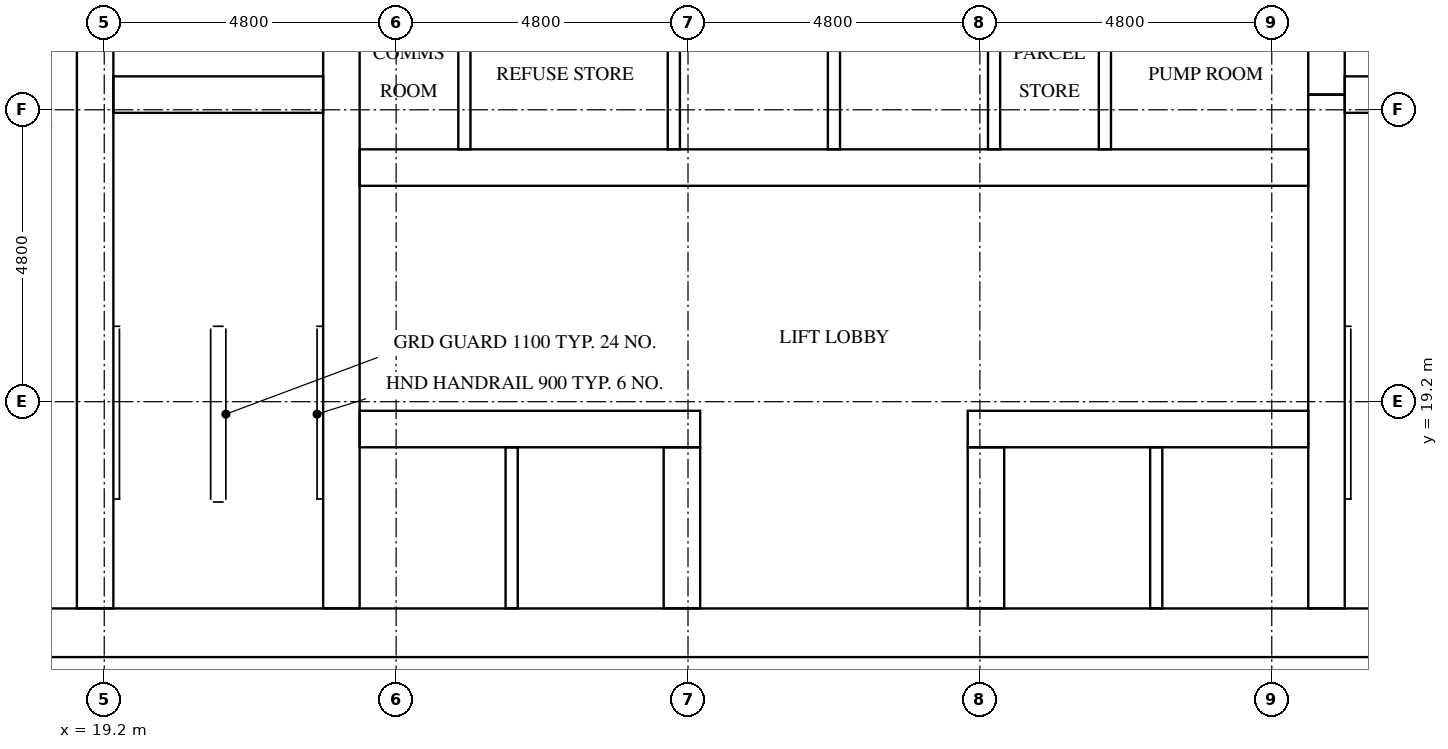
"""IFC4 building model, lengths in metres.
Left out: names, types, materials, properties, quantities, classifications, styles, units other than length and angle.
Written with IfcOpenShell. Run it as: python <this file> out.ifc"""

import sys

from ifc_helpers import new_model, si_unit, direction, frame, frame_2d, origin, place, context, subcontext, project, spatial, rectangle, extrude, element, fill, save


model = new_model("IFC4")
c1 = context("Model", 3, precision=1e-05, world=origin(), true_north=direction((0.0, 1.0)))
c2 = subcontext(c1, "Body", "Model", "MODEL_VIEW")
j1 = project(units=[si_unit("LENGTHUNIT", "METRE"), si_unit("PLANEANGLEUNIT", "RADIAN")], contexts=[c1])
p1 = place(None, origin())
s1 = spatial("IfcSite", under=j1, at=p1, CompositionType="ELEMENT")
p2 = place(p1, origin())
s2 = spatial("IfcBuilding", under=s1, at=p2, CompositionType="ELEMENT")
p3 = place(p2, frame((0.0, 0.0, 122.6)))
s3 = spatial("IfcBuildingStorey", under=s2, at=p3, CompositionType="ELEMENT", Elevation=122.6)
p4 = place(p3, frame((15.0, 15.4, 0.0), z_axis=(0.0, 0.0, 1.0), x_axis=(1.0, 0.0, 0.0)))
e1 = element("IfcWall", 1, at=p4, inside=s3, PredefinedType="SHEAR", context=c2, shape_type="SweptSolid", body=[
    extrude(rectangle(XDim=32.4, YDim=0.8, at=frame_2d((16.2, 0.0))), origin(), (0.0, 0.0, 1.0), 3.2),
])
p5 = place(p4, frame((15.3, 0.0, 0.0)))
e2 = element("IfcOpeningElement", 2, at=p5, cuts=e1, PredefinedType="OPENING", context=c2, shape_type="SweptSolid", body=[
    extrude(rectangle(XDim=1.8, YDim=2.1, at=frame_2d((0.9, 1.05))), frame((0.0, 0.41, 0.0), z_axis=(0.0, -1.0, 0.0), x_axis=(1.0, 0.0, 0.0)), (0.0, 0.0, 1.0), 0.82),
])
p6 = place(p3, frame((19.05, 15.8, 0.0), z_axis=(0.0, 0.0, 1.0), x_axis=(0.0, 1.0, 0.0)))
e3 = element("IfcWall", 3, at=p6, inside=s3, PredefinedType="SHEAR", context=c2, shape_type="SweptSolid", body=[
    extrude(rectangle(XDim=15.15, YDim=0.6, at=frame_2d((7.575, 0.0))), origin(), (0.0, 0.0, 1.0), 3.2),
])
p7 = place(p6, frame((9.65, 0.0, 0.0)))
e4 = element("IfcOpeningElement", 4, at=p7, cuts=e3, PredefinedType="OPENING", context=c2, shape_type="SweptSolid", body=[
    extrude(rectangle(XDim=1.1, YDim=2.1, at=frame_2d((0.55, 1.05))), frame((0.0, 0.31, 0.0), z_axis=(0.0, -1.0, 0.0), x_axis=(1.0, 0.0, 0.0)), (0.0, 0.0, 1.0), 0.62),
])
p8 = place(p6, frame((13.15, 0.0, 0.0)))
e5 = element("IfcOpeningElement", 5, at=p8, cuts=e3, PredefinedType="OPENING", context=c2, shape_type="SweptSolid", body=[
    extrude(rectangle(XDim=1.1, YDim=2.1, at=frame_2d((0.55, 1.05))), frame((0.0, 0.31, 0.0), z_axis=(0.0, -1.0, 0.0), x_axis=(1.0, 0.0, 0.0)), (0.0, 0.0, 1.0), 0.62),
])
p9 = place(p6, frame((0.4, 0.0, 0.0)))
e6 = element("IfcOpeningElement", 6, at=p9, cuts=e3, PredefinedType="OPENING", context=c2, shape_type="SweptSolid", body=[
    extrude(rectangle(XDim=1.2, YDim=2.1, at=frame_2d((0.6, 1.05))), frame((0.0, 0.31, 0.0), z_axis=(0.0, -1.0, 0.0), x_axis=(1.0, 0.0, 0.0)), (0.0, 0.0, 1.0), 0.62),
])
p10 = place(p3, frame((23.1, 15.8, 0.0), z_axis=(0.0, 0.0, 1.0), x_axis=(0.0, 1.0, 0.0)))
e7 = element("IfcWall", 7, at=p10, inside=s3, PredefinedType="SHEAR", context=c2, shape_type="SweptSolid", body=[
    extrude(rectangle(XDim=21.2, YDim=0.6, at=frame_2d((10.6, 0.0))), origin(), (0.0, 0.0, 1.0), 3.2),
])
p11 = place(p3, frame((39.3, 15.8, 0.0), z_axis=(0.0, 0.0, 1.0), x_axis=(0.0, 1.0, 0.0)))
e8 = element("IfcWall", 8, at=p11, inside=s3, PredefinedType="SHEAR", context=c2, shape_type="SweptSolid", body=[
    extrude(rectangle(XDim=8.45, YDim=0.6, at=frame_2d((4.225, 0.0))), origin(), (0.0, 0.0, 1.0), 3.2),
])
p12 = place(p3, frame((39.3, 24.25, 0.0), z_axis=(0.0, 0.0, 1.0), x_axis=(0.0, 1.0, 0.0)))
e9 = element("IfcWall", 9, at=p12, inside=s3, PredefinedType="SHEAR", context=c2, shape_type="SweptSolid", body=[
    extrude(rectangle(XDim=3.5, YDim=0.6, at=frame_2d((1.75, 0.0))), origin(), (0.0, 0.0, 1.0), 3.2),
])
for number, where, z_axis, x_axis in (
    (10, (19.35, 24.25, 0.0), (0.0, 0.0, 1.0), (1.0, 0.0, 0.0)),
    (11, (39.6, 24.25, 0.0), (0.0, 0.0, 1.0), (1.0, 0.0, 0.0)),
):
    element("IfcWall", number, at=place(p3, frame(where, z_axis=z_axis, x_axis=x_axis)), inside=s3, PredefinedType="SHEAR", context=c2, shape_type="SweptSolid", body=[
        extrude(rectangle(XDim=3.45, YDim=0.6, at=frame_2d((1.725, 0.0))), origin(), (0.0, 0.0, 1.0), 3.2),
    ])
p13 = place(p3, frame((23.4, 18.75, 0.0), z_axis=(0.0, 0.0, 1.0), x_axis=(1.0, 0.0, 0.0)))
e12 = element("IfcWall", 12, at=p13, inside=s3, PredefinedType="SHEAR", context=c2, shape_type="SweptSolid", body=[
    extrude(rectangle(XDim=5.6, YDim=0.6, at=frame_2d((2.8, 0.0))), origin(), (0.0, 0.0, 1.0), 3.2),
])
p14 = place(p13, frame((0.65, 0.0, 0.0)))
e13 = element("IfcOpeningElement", 13, at=p14, cuts=e12, PredefinedType="OPENING", context=c2, shape_type="SweptSolid", body=[
    extrude(rectangle(XDim=1.1, YDim=2.1, at=frame_2d((0.55, 1.05))), frame((0.0, 0.31, 0.0), z_axis=(0.0, -1.0, 0.0), x_axis=(1.0, 0.0, 0.0)), (0.0, 0.0, 1.0), 0.62),
])
p15 = place(p13, frame((3.25, 0.0, 0.0)))
e14 = element("IfcOpeningElement", 14, at=p15, cuts=e12, PredefinedType="OPENING", context=c2, shape_type="SweptSolid", body=[
    extrude(rectangle(XDim=1.1, YDim=2.1, at=frame_2d((0.55, 1.05))), frame((0.0, 0.31, 0.0), z_axis=(0.0, -1.0, 0.0), x_axis=(1.0, 0.0, 0.0)), (0.0, 0.0, 1.0), 0.62),
])
p16 = place(p3, frame((33.4, 18.75, 0.0), z_axis=(0.0, 0.0, 1.0), x_axis=(1.0, 0.0, 0.0)))
e15 = element("IfcWall", 15, at=p16, inside=s3, PredefinedType="SHEAR", context=c2, shape_type="SweptSolid", body=[
    extrude(rectangle(XDim=5.6, YDim=0.6, at=frame_2d((2.8, 0.0))), origin(), (0.0, 0.0, 1.0), 3.2),
])
p17 = place(p16, frame((1.25, 0.0, 0.0)))
e16 = element("IfcOpeningElement", 16, at=p17, cuts=e15, PredefinedType="OPENING", context=c2, shape_type="SweptSolid", body=[
    extrude(rectangle(XDim=1.1, YDim=2.1, at=frame_2d((0.55, 1.05))), frame((0.0, 0.31, 0.0), z_axis=(0.0, -1.0, 0.0), x_axis=(1.0, 0.0, 0.0)), (0.0, 0.0, 1.0), 0.62),
])
p18 = place(p16, frame((3.85, 0.0, 0.0)))
e17 = element("IfcOpeningElement", 17, at=p18, cuts=e15, PredefinedType="OPENING", context=c2, shape_type="SweptSolid", body=[
    extrude(rectangle(XDim=1.1, YDim=2.1, at=frame_2d((0.55, 1.05))), frame((0.0, 0.31, 0.0), z_axis=(0.0, -1.0, 0.0), x_axis=(1.0, 0.0, 0.0)), (0.0, 0.0, 1.0), 0.62),
])
p19 = place(p3, frame((23.4, 23.05, 0.0), z_axis=(0.0, 0.0, 1.0), x_axis=(1.0, 0.0, 0.0)))
e18 = element("IfcWall", 18, at=p19, inside=s3, PredefinedType="SHEAR", context=c2, shape_type="SweptSolid", body=[
    extrude(rectangle(XDim=15.6, YDim=0.6, at=frame_2d((7.8, 0.0))), origin(), (0.0, 0.0, 1.0), 3.2),
])
p20 = place(p19, frame((0.311, 0.0, 0.0)))
e19 = element("IfcOpeningElement", 19, at=p20, cuts=e18, PredefinedType="OPENING", context=c2, shape_type="SweptSolid", body=[
    extrude(rectangle(XDim=1.0, YDim=2.1, at=frame_2d((0.5, 1.05))), frame((0.0, 0.31, 0.0), z_axis=(0.0, -1.0, 0.0), x_axis=(1.0, 0.0, 0.0)), (0.0, 0.0, 1.0), 0.62),
])
p21 = place(p19, frame((2.945, 0.0, 0.0)))
e20 = element("IfcOpeningElement", 20, at=p21, cuts=e18, PredefinedType="OPENING", context=c2, shape_type="SweptSolid", body=[
    extrude(rectangle(XDim=1.0, YDim=2.1, at=frame_2d((0.5, 1.05))), frame((0.0, 0.31, 0.0), z_axis=(0.0, -1.0, 0.0), x_axis=(1.0, 0.0, 0.0)), (0.0, 0.0, 1.0), 0.62),
])
p22 = place(p19, frame((10.845, 0.0, 0.0)))
e21 = element("IfcOpeningElement", 21, at=p22, cuts=e18, PredefinedType="OPENING", context=c2, shape_type="SweptSolid", body=[
    extrude(rectangle(XDim=1.0, YDim=2.1, at=frame_2d((0.5, 1.05))), frame((0.0, 0.31, 0.0), z_axis=(0.0, -1.0, 0.0), x_axis=(1.0, 0.0, 0.0)), (0.0, 0.0, 1.0), 0.62),
])
p23 = place(p19, frame((13.478, 0.0, 0.0)))
e22 = element("IfcOpeningElement", 22, at=p23, cuts=e18, PredefinedType="OPENING", context=c2, shape_type="SweptSolid", body=[
    extrude(rectangle(XDim=1.0, YDim=2.1, at=frame_2d((0.5, 1.05))), frame((0.0, 0.31, 0.0), z_axis=(0.0, -1.0, 0.0), x_axis=(1.0, 0.0, 0.0)), (0.0, 0.0, 1.0), 0.62),
])
for number, where, z_axis, x_axis in (
    (23, (28.7, 15.8, 0.0), (0.0, 0.0, 1.0), (0.0, 1.0, 0.0)),
    (24, (33.7, 15.8, 0.0), (0.0, 0.0, 1.0), (0.0, 1.0, 0.0)),
):
    element("IfcWall", number, at=place(p3, frame(where, z_axis=z_axis, x_axis=x_axis)), inside=s3, PredefinedType="SHEAR", context=c2, shape_type="SweptSolid", body=[
        extrude(rectangle(XDim=2.65, YDim=0.6, at=frame_2d((1.325, 0.0))), origin(), (0.0, 0.0, 1.0), 3.2),
    ])
for number, where, z_axis, x_axis in (
    (25, (28.567, 23.35, 0.0), (0.0, 0.0, 1.0), (0.0, 1.0, 0.0)),
    (26, (31.2, 23.35, 0.0), (0.0, 0.0, 1.0), (0.0, 1.0, 0.0)),
    (27, (33.833, 23.35, 0.0), (0.0, 0.0, 1.0), (0.0, 1.0, 0.0)),
):
    element("IfcWall", number, at=place(p3, frame(where, z_axis=z_axis, x_axis=x_axis)), inside=s3, PredefinedType="SOLIDWALL", context=c2, shape_type="SweptSolid", body=[
        extrude(rectangle(XDim=2.5, YDim=0.2, at=frame_2d((1.25, 0.0))), origin(), (0.0, 0.0, 1.0), 3.2),
    ])
for number, where, z_axis, x_axis in (
    (28, (25.9, 15.8, 0.0), (0.0, 0.0, 1.0), (0.0, 1.0, 0.0)),
    (29, (36.5, 15.8, 0.0), (0.0, 0.0, 1.0), (0.0, 1.0, 0.0)),
):
    element("IfcWall", number, at=place(p3, frame(where, z_axis=z_axis, x_axis=x_axis)), inside=s3, PredefinedType="SOLIDWALL", context=c2, shape_type="SweptSolid", body=[
        extrude(rectangle(XDim=2.65, YDim=0.2, at=frame_2d((1.325, 0.0))), origin(), (0.0, 0.0, 1.0), 3.2),
    ])
for number, where, z_axis, x_axis in (
    (30, (25.123, 23.35, 0.0), (0.0, 0.0, 1.0), (0.0, 1.0, 0.0)),
    (31, (35.656, 23.35, 0.0), (0.0, 0.0, 1.0), (0.0, 1.0, 0.0)),
):
    element("IfcWall", number, at=place(p3, frame(where, z_axis=z_axis, x_axis=x_axis)), inside=s3, PredefinedType="PARTITIONING", context=c2, shape_type="SweptSolid", body=[
        extrude(rectangle(XDim=2.5, YDim=0.2, at=frame_2d((1.25, 0.0))), origin(), (0.0, 0.0, 1.0), 3.2),
    ])
p24 = place(p14, origin())
e32 = element("IfcDoor", 32, at=p24, inside=s3, OperationType="DOUBLE_DOOR_SLIDING", PredefinedType="DOOR", context=c2, shape_type="SweptSolid", body=[
    extrude(rectangle(XDim=1.1, YDim=2.1, at=frame_2d((0.55, 1.05))), frame((0.0, 0.025, 0.0), z_axis=(0.0, -1.0, 0.0), x_axis=(1.0, 0.0, 0.0)), (0.0, 0.0, 1.0), 0.05),
])
fill(e13, e32)
p25 = place(p15, origin())
e33 = element("IfcDoor", 33, at=p25, inside=s3, OperationType="DOUBLE_DOOR_SLIDING", PredefinedType="DOOR", context=c2, shape_type="SweptSolid", body=[
    extrude(rectangle(XDim=1.1, YDim=2.1, at=frame_2d((0.55, 1.05))), frame((0.0, 0.025, 0.0), z_axis=(0.0, -1.0, 0.0), x_axis=(1.0, 0.0, 0.0)), (0.0, 0.0, 1.0), 0.05),
])
fill(e14, e33)
p26 = place(p17, origin())
e34 = element("IfcDoor", 34, at=p26, inside=s3, OperationType="DOUBLE_DOOR_SLIDING", PredefinedType="DOOR", context=c2, shape_type="SweptSolid", body=[
    extrude(rectangle(XDim=1.1, YDim=2.1, at=frame_2d((0.55, 1.05))), frame((0.0, 0.025, 0.0), z_axis=(0.0, -1.0, 0.0), x_axis=(1.0, 0.0, 0.0)), (0.0, 0.0, 1.0), 0.05),
])
fill(e16, e34)
p27 = place(p18, origin())
e35 = element("IfcDoor", 35, at=p27, inside=s3, OperationType="DOUBLE_DOOR_SLIDING", PredefinedType="DOOR", context=c2, shape_type="SweptSolid", body=[
    extrude(rectangle(XDim=1.1, YDim=2.1, at=frame_2d((0.55, 1.05))), frame((0.0, 0.025, 0.0), z_axis=(0.0, -1.0, 0.0), x_axis=(1.0, 0.0, 0.0)), (0.0, 0.0, 1.0), 0.05),
])
fill(e17, e35)
p28 = place(p9, frame((1.2, 0.0, 0.0), z_axis=(0.0, 0.0, 1.0), x_axis=(-1.0, 0.0, 0.0)))
e36 = element("IfcDoor", 36, at=p28, inside=s3, OperationType="SINGLE_SWING_LEFT", PredefinedType="DOOR", context=c2, shape_type="SweptSolid", body=[
    extrude(rectangle(XDim=1.2, YDim=2.1, at=frame_2d((0.6, 1.05))), frame((0.0, 0.025, 0.0), z_axis=(0.0, -1.0, 0.0), x_axis=(1.0, 0.0, 0.0)), (0.0, 0.0, 1.0), 0.05),
])
fill(e6, e36)
p29 = place(p5, frame((1.8, 0.0, 0.0), z_axis=(0.0, 0.0, 1.0), x_axis=(-1.0, 0.0, 0.0)))
e37 = element("IfcDoor", 37, at=p29, inside=s3, OperationType="DOUBLE_DOOR_SINGLE_SWING", PredefinedType="DOOR", context=c2, shape_type="SweptSolid", body=[
    extrude(rectangle(XDim=1.8, YDim=2.1, at=frame_2d((0.9, 1.05))), frame((0.0, 0.025, 0.0), z_axis=(0.0, -1.0, 0.0), x_axis=(1.0, 0.0, 0.0)), (0.0, 0.0, 1.0), 0.05),
])
fill(e2, e37)
p30 = place(p20, frame((1.0, 0.0, 0.0), z_axis=(0.0, 0.0, 1.0), x_axis=(-1.0, 0.0, 0.0)))
e38 = element("IfcDoor", 38, at=p30, inside=s3, OperationType="SINGLE_SWING_RIGHT", PredefinedType="DOOR", context=c2, shape_type="SweptSolid", body=[
    extrude(rectangle(XDim=1.0, YDim=2.1, at=frame_2d((0.5, 1.05))), frame((0.0, 0.025, 0.0), z_axis=(0.0, -1.0, 0.0), x_axis=(1.0, 0.0, 0.0)), (0.0, 0.0, 1.0), 0.05),
])
fill(e19, e38)
p31 = place(p21, frame((1.0, 0.0, 0.0), z_axis=(0.0, 0.0, 1.0), x_axis=(-1.0, 0.0, 0.0)))
e39 = element("IfcDoor", 39, at=p31, inside=s3, OperationType="SINGLE_SWING_LEFT", PredefinedType="DOOR", context=c2, shape_type="SweptSolid", body=[
    extrude(rectangle(XDim=1.0, YDim=2.1, at=frame_2d((0.5, 1.05))), frame((0.0, 0.025, 0.0), z_axis=(0.0, -1.0, 0.0), x_axis=(1.0, 0.0, 0.0)), (0.0, 0.0, 1.0), 0.05),
])
fill(e20, e39)
p32 = place(p22, frame((1.0, 0.0, 0.0), z_axis=(0.0, 0.0, 1.0), x_axis=(-1.0, 0.0, 0.0)))
e40 = element("IfcDoor", 40, at=p32, inside=s3, OperationType="SINGLE_SWING_RIGHT", PredefinedType="DOOR", context=c2, shape_type="SweptSolid", body=[
    extrude(rectangle(XDim=1.0, YDim=2.1, at=frame_2d((0.5, 1.05))), frame((0.0, 0.025, 0.0), z_axis=(0.0, -1.0, 0.0), x_axis=(1.0, 0.0, 0.0)), (0.0, 0.0, 1.0), 0.05),
])
fill(e21, e40)
p33 = place(p23, frame((1.0, 0.0, 0.0), z_axis=(0.0, 0.0, 1.0), x_axis=(-1.0, 0.0, 0.0)))
e41 = element("IfcDoor", 41, at=p33, inside=s3, OperationType="SINGLE_SWING_LEFT", PredefinedType="DOOR", context=c2, shape_type="SweptSolid", body=[
    extrude(rectangle(XDim=1.0, YDim=2.1, at=frame_2d((0.5, 1.05))), frame((0.0, 0.025, 0.0), z_axis=(0.0, -1.0, 0.0), x_axis=(1.0, 0.0, 0.0)), (0.0, 0.0, 1.0), 0.05),
])
fill(e22, e41)
save(model, sys.argv[1])
